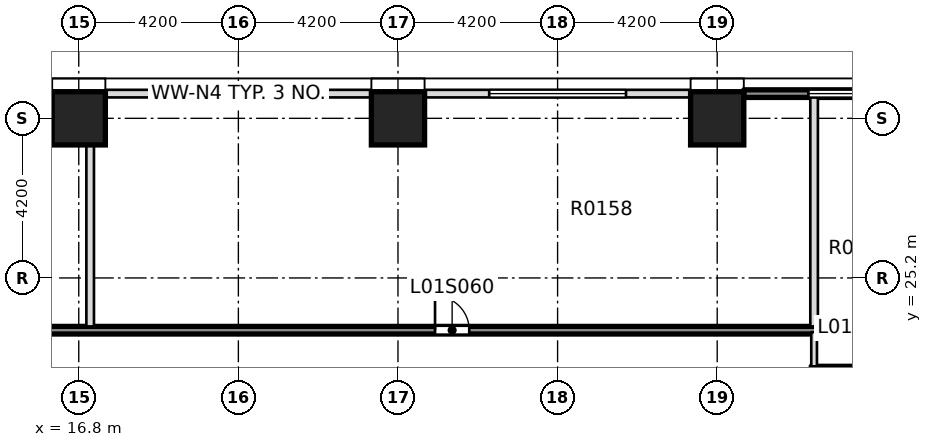
"""IFC4 building model, lengths in metres.
Left out: names, types, materials, properties, quantities, classifications, styles, units other than length and angle.
Written with IfcOpenShell. Run it as: python <this file> out.ifc"""

import sys

from ifc_helpers import new_model, si_unit, direction, frame, frame_2d, origin, origin_2d, place, context, subcontext, project, spatial, rectangle, extrude, element, fill, save


model = new_model("IFC4")
c1 = context("Model", 3, precision=1e-05, world=origin(), true_north=direction((0.0, 1.0)))
c2 = subcontext(c1, "Body", "Model", "MODEL_VIEW")
j1 = project(units=[si_unit("LENGTHUNIT", "METRE"), si_unit("PLANEANGLEUNIT", "RADIAN")], contexts=[c1])
p1 = place(None, origin())
s1 = spatial("IfcSite", under=j1, at=p1, CompositionType="ELEMENT")
p2 = place(p1, origin())
s2 = spatial("IfcBuilding", under=s1, at=p2, CompositionType="ELEMENT")
p3 = place(p2, frame((0.0, 0.0, 7.5)))
s3 = spatial("IfcBuildingStorey", under=s2, at=p3, CompositionType="ELEMENT", Elevation=7.5)
for number, where, z_axis, x_axis in (
    (1, (16.8, 29.4, 0.0), (0.0, 0.0, 1.0), (1.0, 0.0, 0.0)),
    (2, (25.2, 29.4, 0.0), (0.0, 0.0, 1.0), (1.0, 0.0, 0.0)),
):
    element("IfcColumn", number, at=place(p3, frame(where, z_axis=z_axis, x_axis=x_axis)), inside=s3, PredefinedType="COLUMN", context=c2, shape_type="SweptSolid", body=[
        extrude(rectangle(XDim=1.4, YDim=1.4, at=origin_2d()), origin(), (0.0, 0.0, 1.0), 5.0),
    ])
p4 = place(p3, frame((33.6, 29.4, 0.0), z_axis=(0.0, 0.0, 1.0), x_axis=(1.0, 0.0, 0.0)))
e3 = element("IfcColumn", 3, at=p4, inside=s3, PredefinedType="COLUMN", context=c2, shape_type="SweptSolid", body=[
    extrude(rectangle(XDim=1.4, YDim=1.4, at=origin_2d()), origin(), (0.0, 0.0, 1.0), 4.6),
])
p5 = place(p3, frame((36.075, 22.775, 0.0), z_axis=(0.0, 0.0, 1.0), x_axis=(1.0, 0.0, 0.0)))
e4 = element("IfcWall", 4, at=p5, inside=s3, PredefinedType="SOLIDWALL", context=c2, shape_type="SweptSolid", body=[
    extrude(rectangle(XDim=6.3, YDim=0.2, at=frame_2d((3.15, 0.0))), origin(), (0.0, 0.0, 1.0), 4.6),
])
p6 = place(p5, frame((0.675, 0.0, 0.0)))
e5 = element("IfcOpeningElement", 5, at=p6, cuts=e4, PredefinedType="OPENING", context=c2, shape_type="SweptSolid", body=[
    extrude(rectangle(XDim=1.2, YDim=2.1, at=frame_2d((0.6, 1.05))), frame((0.0, 0.11, 0.0), z_axis=(0.0, -1.0, 0.0), x_axis=(1.0, 0.0, 0.0)), (0.0, 0.0, 1.0), 0.22),
])
p7 = place(p3, frame((-15.2, 23.825, 0.0), z_axis=(0.0, 0.0, 1.0), x_axis=(1.0, 0.0, 0.0)))
e6 = element("IfcWall", 6, at=p7, inside=s3, PredefinedType="SOLIDWALL", context=c2, shape_type="SweptSolid", body=[
    extrude(rectangle(XDim=51.45, YDim=0.2, at=frame_2d((25.725, 0.0))), origin(), (0.0, 0.0, 1.0), 4.6),
])
p8 = place(p7, frame((17.9, 0.0, 0.0)))
e7 = element("IfcOpeningElement", 7, at=p8, cuts=e6, PredefinedType="OPENING", context=c2, shape_type="SweptSolid", body=[
    extrude(rectangle(XDim=1.2, YDim=2.1, at=frame_2d((0.6, 1.05))), frame((0.0, 0.11, 0.0), z_axis=(0.0, -1.0, 0.0), x_axis=(1.0, 0.0, 0.0)), (0.0, 0.0, 1.0), 0.22),
])
p9 = place(p7, frame((1.7, 0.0, 0.0)))
e8 = element("IfcOpeningElement", 8, at=p9, cuts=e6, PredefinedType="OPENING", context=c2, shape_type="SweptSolid", body=[
    extrude(rectangle(XDim=0.9, YDim=2.1, at=frame_2d((0.45, 1.05))), frame((0.0, 0.11, 0.0), z_axis=(0.0, -1.0, 0.0), x_axis=(1.0, 0.0, 0.0)), (0.0, 0.0, 1.0), 0.22),
])
p10 = place(p7, frame((8.225, 0.0, 0.0)))
e9 = element("IfcOpeningElement", 9, at=p10, cuts=e6, PredefinedType="OPENING", context=c2, shape_type="SweptSolid", body=[
    extrude(rectangle(XDim=0.9, YDim=2.1, at=frame_2d((0.45, 1.05))), frame((0.0, 0.11, 0.0), z_axis=(0.0, -1.0, 0.0), x_axis=(1.0, 0.0, 0.0)), (0.0, 0.0, 1.0), 0.22),
])
p11 = place(p7, frame((23.3, 0.0, 0.0)))
e10 = element("IfcOpeningElement", 10, at=p11, cuts=e6, PredefinedType="OPENING", context=c2, shape_type="SweptSolid", body=[
    extrude(rectangle(XDim=1.2, YDim=2.1, at=frame_2d((0.6, 1.05))), frame((0.0, 0.11, 0.0), z_axis=(0.0, -1.0, 0.0), x_axis=(1.0, 0.0, 0.0)), (0.0, 0.0, 1.0), 0.22),
])
p12 = place(p7, frame((29.75, 0.0, 0.0)))
e11 = element("IfcOpeningElement", 11, at=p12, cuts=e6, PredefinedType="OPENING", context=c2, shape_type="SweptSolid", body=[
    extrude(rectangle(XDim=0.9, YDim=2.1, at=frame_2d((0.45, 1.05))), frame((0.0, 0.11, 0.0), z_axis=(0.0, -1.0, 0.0), x_axis=(1.0, 0.0, 0.0)), (0.0, 0.0, 1.0), 0.22),
])
p13 = place(p7, frame((41.375, 0.0, 0.0)))
e12 = element("IfcOpeningElement", 12, at=p13, cuts=e6, PredefinedType="OPENING", context=c2, shape_type="SweptSolid", body=[
    extrude(rectangle(XDim=0.9, YDim=2.1, at=frame_2d((0.45, 1.05))), frame((0.0, 0.11, 0.0), z_axis=(0.0, -1.0, 0.0), x_axis=(1.0, 0.0, 0.0)), (0.0, 0.0, 1.0), 0.22),
])
p14 = place(p3, frame((17.1, 23.925, 0.0), z_axis=(0.0, 0.0, 1.0), x_axis=(0.0, 1.0, 0.0)))
e13 = element("IfcWall", 13, at=p14, inside=s3, PredefinedType="PARTITIONING", context=c2, shape_type="SweptSolid", body=[
    extrude(rectangle(XDim=6.025, YDim=0.2, at=frame_2d((3.012, 0.0))), origin(), (0.0, 0.0, 1.0), 4.6),
])
p15 = place(p3, frame((36.15, 22.875, 0.0), z_axis=(0.0, 0.0, 1.0), x_axis=(0.0, 1.0, 0.0)))
e14 = element("IfcWall", 14, at=p15, inside=s3, PredefinedType="PARTITIONING", context=c2, shape_type="SweptSolid", body=[
    extrude(rectangle(XDim=0.9, YDim=0.15, at=frame_2d((0.45, 0.0))), origin(), (0.0, 0.0, 1.0), 4.6),
])
p16 = place(p3, frame((36.15, 23.925, 0.0), z_axis=(0.0, 0.0, 1.0), x_axis=(0.0, 1.0, 0.0)))
e15 = element("IfcWall", 15, at=p16, inside=s3, PredefinedType="PARTITIONING", context=c2, shape_type="SweptSolid", body=[
    extrude(rectangle(XDim=6.025, YDim=0.2, at=frame_2d((3.012, 0.0))), origin(), (0.0, 0.0, 1.0), 4.6),
])
p17 = place(p3, frame((34.3, 30.05, 0.0), z_axis=(0.0, 0.0, 1.0), x_axis=(1.0, 0.0, 0.0)))
e16 = element("IfcWall", 16, at=p17, inside=s3, PredefinedType="SOLIDWALL", context=c2, shape_type="SweptSolid", body=[
    extrude(rectangle(XDim=7.0, YDim=0.2, at=frame_2d((3.5, 0.0))), origin(), (0.0, 0.0, 1.0), 4.6),
])
p18 = place(p17, frame((1.7, 0.0, 0.9)))
e17 = element("IfcOpeningElement", 17, at=p18, cuts=e16, PredefinedType="OPENING", context=c2, shape_type="SweptSolid", body=[
    extrude(rectangle(XDim=3.6, YDim=2.8, at=frame_2d((1.8, 1.4))), frame((0.0, 0.11, 0.0), z_axis=(0.0, -1.0, 0.0), x_axis=(1.0, 0.0, 0.0)), (0.0, 0.0, 1.0), 0.22),
])
p19 = place(p3, frame((32.9, 30.05, 0.0), z_axis=(0.0, 0.0, 1.0), x_axis=(-1.0, 0.0, 0.0)))
e18 = element("IfcWall", 18, at=p19, inside=s3, PredefinedType="STANDARD", context=c2, shape_type="SweptSolid", body=[
    extrude(rectangle(XDim=7.0, YDim=0.2, at=frame_2d((3.5, 0.0))), origin(), (0.0, 0.0, 1.0), 4.6),
])
p20 = place(p19, frame((1.7, 0.0, 0.9)))
e19 = element("IfcOpeningElement", 19, at=p20, cuts=e18, PredefinedType="OPENING", context=c2, shape_type="SweptSolid", body=[
    extrude(rectangle(XDim=3.6, YDim=2.8, at=frame_2d((1.8, 1.4))), frame((0.0, 0.11, 0.0), z_axis=(0.0, -1.0, 0.0), x_axis=(1.0, 0.0, 0.0)), (0.0, 0.0, 1.0), 0.22),
])
p21 = place(p3, frame((24.5, 30.05, 0.0), z_axis=(0.0, 0.0, 1.0), x_axis=(-1.0, 0.0, 0.0)))
e20 = element("IfcWall", 20, at=p21, inside=s3, PredefinedType="STANDARD", context=c2, shape_type="SweptSolid", body=[
    extrude(rectangle(XDim=7.0, YDim=0.2, at=frame_2d((3.5, 0.0))), origin(), (0.0, 0.0, 1.0), 4.6),
])
p22 = place(p21, frame((1.7, 0.0, 0.9)))
e21 = element("IfcOpeningElement", 21, at=p22, cuts=e20, PredefinedType="OPENING", context=c2, shape_type="SweptSolid", body=[
    extrude(rectangle(XDim=3.6, YDim=2.8, at=frame_2d((1.8, 1.4))), frame((0.0, 0.11, 0.0), z_axis=(0.0, -1.0, 0.0), x_axis=(1.0, 0.0, 0.0)), (0.0, 0.0, 1.0), 0.22),
])
p23 = place(p13, origin())
e22 = element("IfcDoor", 22, at=p23, inside=s3, OperationType="SINGLE_SWING_RIGHT", PredefinedType="DOOR", context=c2, shape_type="SweptSolid", body=[
    extrude(rectangle(XDim=0.9, YDim=2.1, at=frame_2d((0.45, 1.05))), frame((0.0, 0.025, 0.0), z_axis=(0.0, -1.0, 0.0), x_axis=(1.0, 0.0, 0.0)), (0.0, 0.0, 1.0), 0.05),
])
fill(e12, e22)
p24 = place(p18, origin())
e23 = element("IfcWindow", 23, at=p24, inside=s3, PartitioningType="SINGLE_PANEL", PredefinedType="WINDOW", context=c2, shape_type="SweptSolid", body=[
    extrude(rectangle(XDim=3.6, YDim=2.8, at=frame_2d((1.8, 1.4))), frame((0.0, 0.03, 0.0), z_axis=(0.0, -1.0, 0.0), x_axis=(1.0, 0.0, 0.0)), (0.0, 0.0, 1.0), 0.06),
])
fill(e17, e23)
p25 = place(p20, origin())
e24 = element("IfcWindow", 24, at=p25, inside=s3, PartitioningType="SINGLE_PANEL", PredefinedType="WINDOW", context=c2, shape_type="SweptSolid", body=[
    extrude(rectangle(XDim=3.6, YDim=2.8, at=frame_2d((1.8, 1.4))), frame((0.0, 0.03, 0.0), z_axis=(0.0, -1.0, 0.0), x_axis=(1.0, 0.0, 0.0)), (0.0, 0.0, 1.0), 0.06),
])
fill(e19, e24)
p26 = place(p22, origin())
e25 = element("IfcWindow", 25, at=p26, inside=s3, PartitioningType="SINGLE_PANEL", PredefinedType="WINDOW", context=c2, shape_type="SweptSolid", body=[
    extrude(rectangle(XDim=3.6, YDim=2.8, at=frame_2d((1.8, 1.4))), frame((0.0, 0.03, 0.0), z_axis=(0.0, -1.0, 0.0), x_axis=(1.0, 0.0, 0.0)), (0.0, 0.0, 1.0), 0.06),
])
fill(e21, e25)
save(model, sys.argv[1])
